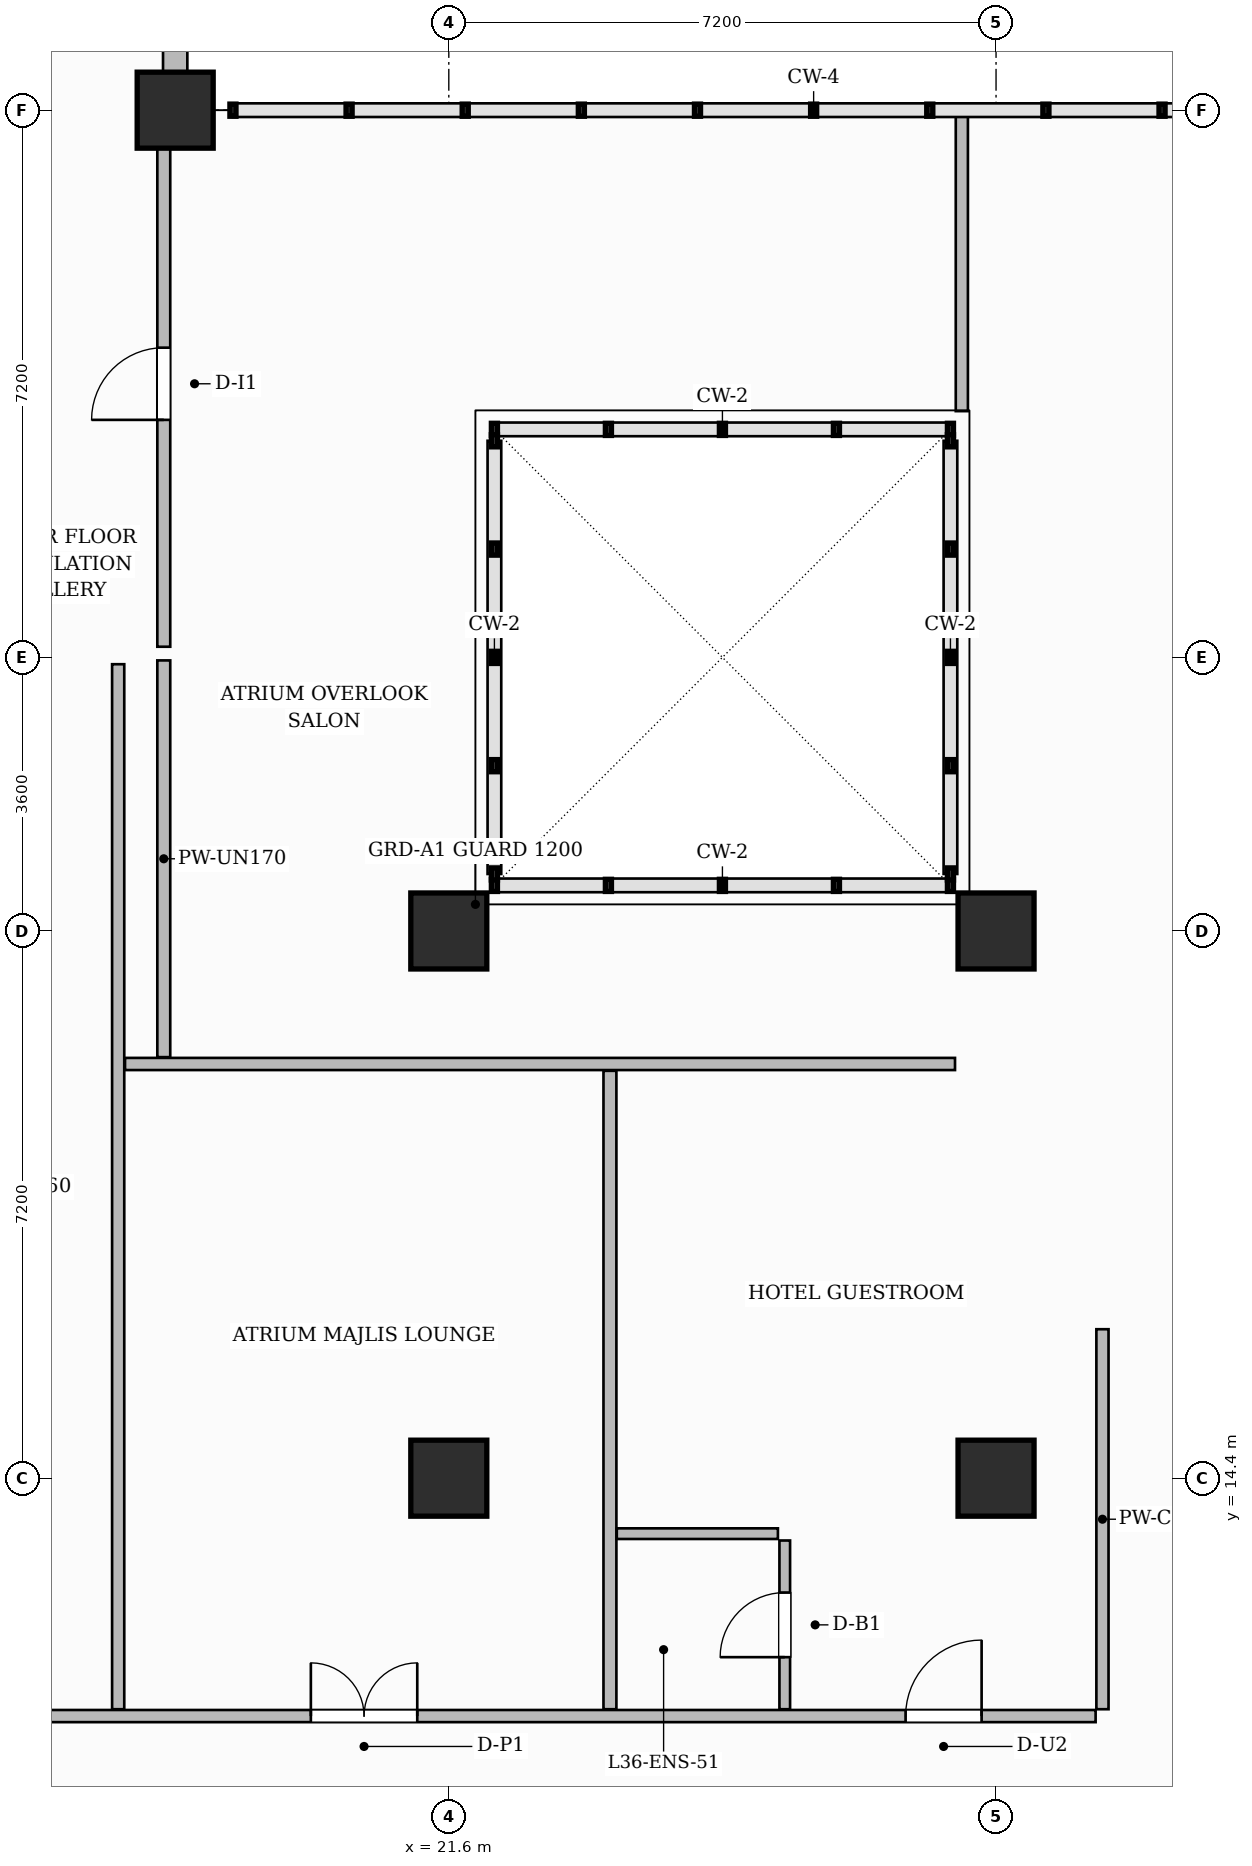
"""IFC4 building model, lengths in metres.
Left out: names, types, materials, properties, quantities, classifications, styles, units other than length and angle.
Written with IfcOpenShell. Run it as: python <this file> out.ifc"""

import sys

from ifc_helpers import new_model, si_unit, direction, frame, frame_2d, origin, origin_2d, place, context, subcontext, project, spatial, rectangle, extrude, source, transform, mapped, element, fill, save


model = new_model("IFC4")
c1 = context("Model", 3, precision=1e-05, world=origin(), true_north=direction((0.0, 1.0)))
c2 = subcontext(c1, "Body", "Model", "MODEL_VIEW")
j1 = project(units=[si_unit("LENGTHUNIT", "METRE"), si_unit("PLANEANGLEUNIT", "RADIAN")], contexts=[c1])
p1 = place(None, origin())
s1 = spatial("IfcSite", under=j1, at=p1, CompositionType="ELEMENT")
p2 = place(p1, origin())
s2 = spatial("IfcBuilding", under=s1, at=p2, CompositionType="ELEMENT")
p3 = place(p2, frame((0.0, 0.0, 145.1)))
s3 = spatial("IfcBuildingStorey", under=s2, at=p3, CompositionType="ELEMENT", Elevation=145.1)
m1 = source(origin(), c2, "Body", "SweptSolid", [
    extrude(rectangle(XDim=1.0, YDim=1.0, at=origin_2d()), origin(), (0.0, 0.0, 1.0), 5.2),
])
for number, where, z_axis, x_axis in (
    (1, (21.6, 14.4, 0.0), (0.0, 0.0, 1.0), (1.0, 0.0, 0.0)),
    (2, (21.6, 21.6, 0.0), (0.0, 0.0, 1.0), (1.0, 0.0, 0.0)),
    (3, (28.8, 14.4, 0.0), (0.0, 0.0, 1.0), (1.0, 0.0, 0.0)),
    (4, (28.8, 21.6, 0.0), (0.0, 0.0, 1.0), (1.0, 0.0, 0.0)),
    (5, (18.0, 32.4, 0.0), (0.0, 0.0, 1.0), (1.0, 0.0, 0.0)),
):
    element("IfcColumn", number, at=place(p3, frame(where, z_axis=z_axis, x_axis=x_axis)), inside=s3, PredefinedType="COLUMN", context=c2, shape_type="MappedRepresentation", body=[
        mapped(m1, transform((0.0, 0.0, 0.0), scale=1.0)),
    ])
p4 = place(p3, frame((14.568, 11.27, 0.0), z_axis=(0.0, 0.0, 1.0), x_axis=(1.0, 0.0, 0.0)))
e6 = element("IfcWall", 6, at=p4, inside=s3, PredefinedType="PARTITIONING", context=c2, shape_type="SweptSolid", body=[
    extrude(rectangle(XDim=15.542, YDim=0.16, at=frame_2d((7.771, 0.0))), origin(), (0.0, 0.0, 1.0), 4.95),
])
p5 = place(p4, frame((5.217, 0.0, 0.0)))
e7 = element("IfcOpeningElement", 7, at=p5, cuts=e6, PredefinedType="OPENING", context=c2, shape_type="SweptSolid", body=[
    extrude(rectangle(XDim=1.4, YDim=2.35, at=frame_2d((0.7, 1.175))), frame((0.0, 0.09, 0.0), z_axis=(0.0, -1.0, 0.0), x_axis=(1.0, 0.0, 0.0)), (0.0, 0.0, 1.0), 0.18),
])
p6 = place(p4, frame((13.042, 0.0, 0.0)))
e8 = element("IfcOpeningElement", 8, at=p6, cuts=e6, PredefinedType="OPENING", context=c2, shape_type="SweptSolid", body=[
    extrude(rectangle(XDim=1.0, YDim=2.2, at=frame_2d((0.5, 1.1))), frame((0.0, 0.09, 0.0), z_axis=(0.0, -1.0, 0.0), x_axis=(1.0, 0.0, 0.0)), (0.0, 0.0, 1.0), 0.18),
])
p7 = place(p3, frame((30.2, 11.36, 0.0), z_axis=(0.0, 0.0, 1.0), x_axis=(0.0, 1.0, 0.0)))
e9 = element("IfcWall", 9, at=p7, inside=s3, PredefinedType="PARTITIONING", context=c2, shape_type="SweptSolid", body=[
    extrude(rectangle(XDim=5.0, YDim=0.16, at=frame_2d((2.5, 0.0))), origin(), (0.0, 0.0, 1.0), 4.95),
])
p8 = place(p3, frame((17.25, 11.36, 0.0), z_axis=(0.0, 0.0, 1.0), x_axis=(0.0, 1.0, 0.0)))
e10 = element("IfcWall", 10, at=p8, inside=s3, PredefinedType="PARTITIONING", context=c2, shape_type="SweptSolid", body=[
    extrude(rectangle(XDim=13.75, YDim=0.16, at=frame_2d((6.875, 0.0))), origin(), (0.0, 0.0, 1.0), 4.95),
])
p9 = place(p3, frame((17.85, 19.94, 0.0), z_axis=(0.0, 0.0, 1.0), x_axis=(0.0, 1.0, 0.0)))
e11 = element("IfcWall", 11, at=p9, inside=s3, PredefinedType="PARTITIONING", context=c2, shape_type="SweptSolid", body=[
    extrude(rectangle(XDim=5.22, YDim=0.17, at=frame_2d((2.61, 0.0))), origin(), (0.0, 0.0, 1.0), 4.435),
])
p10 = place(p3, frame((17.85, 25.34, 0.0), z_axis=(0.0, 0.0, 1.0), x_axis=(0.0, 1.0, 0.0)))
e12 = element("IfcWall", 12, at=p10, inside=s3, PredefinedType="PARTITIONING", context=c2, shape_type="SweptSolid", body=[
    extrude(rectangle(XDim=6.87, YDim=0.17, at=frame_2d((3.435, 0.0))), origin(), (0.0, 0.0, 1.0), 4.95),
])
p11 = place(p10, frame((2.985, 0.0, 0.0)))
e13 = element("IfcOpeningElement", 13, at=p11, cuts=e12, PredefinedType="OPENING", context=c2, shape_type="SweptSolid", body=[
    extrude(rectangle(XDim=0.95, YDim=2.15, at=frame_2d((0.475, 1.075))), frame((0.0, 0.095, 0.0), z_axis=(0.0, -1.0, 0.0), x_axis=(1.0, 0.0, 0.0)), (0.0, 0.0, 1.0), 0.19),
])
p12 = place(p3, frame((28.35, 28.44, 0.0), z_axis=(0.0, 0.0, 1.0), x_axis=(0.0, 1.0, 0.0)))
e14 = element("IfcWall", 14, at=p12, inside=s3, PredefinedType="PARTITIONING", context=c2, shape_type="SweptSolid", body=[
    extrude(rectangle(XDim=3.932, YDim=0.16, at=frame_2d((1.966, 0.0))), origin(), (0.0, 0.0, 1.0), 4.95),
])
p13 = place(p3, frame((17.34, 19.85, 0.0), z_axis=(0.0, 0.0, 1.0), x_axis=(1.0, 0.0, 0.0)))
e15 = element("IfcWall", 15, at=p13, inside=s3, PredefinedType="PARTITIONING", context=c2, shape_type="SweptSolid", body=[
    extrude(rectangle(XDim=10.92, YDim=0.16, at=frame_2d((5.46, 0.0))), origin(), (0.0, 0.0, 1.0), 4.95),
])
p14 = place(p3, frame((23.72, 11.36, 0.0), z_axis=(0.0, 0.0, 1.0), x_axis=(0.0, 1.0, 0.0)))
e16 = element("IfcWall", 16, at=p14, inside=s3, PredefinedType="PARTITIONING", context=c2, shape_type="SweptSolid", body=[
    extrude(rectangle(XDim=8.4, YDim=0.17, at=frame_2d((4.2, 0.0))), origin(), (0.0, 0.0, 1.0), 4.95),
])
p15 = place(p3, frame((26.02, 11.36, 0.0), z_axis=(0.0, 0.0, 1.0), x_axis=(0.0, 1.0, 0.0)))
e17 = element("IfcWall", 17, at=p15, inside=s3, PredefinedType="PARTITIONING", context=c2, shape_type="SweptSolid", body=[
    extrude(rectangle(XDim=2.22, YDim=0.14, at=frame_2d((1.11, 0.0))), origin(), (0.0, 0.0, 1.0), 4.95),
])
p16 = place(p15, frame((0.685, 0.0, 0.0)))
e18 = element("IfcOpeningElement", 18, at=p16, cuts=e17, PredefinedType="OPENING", context=c2, shape_type="SweptSolid", body=[
    extrude(rectangle(XDim=0.85, YDim=2.1, at=frame_2d((0.425, 1.05))), frame((0.0, 0.08, 0.0), z_axis=(0.0, -1.0, 0.0), x_axis=(1.0, 0.0, 0.0)), (0.0, 0.0, 1.0), 0.16),
])
p17 = place(p3, frame((23.81, 13.67, 0.0), z_axis=(0.0, 0.0, 1.0), x_axis=(1.0, 0.0, 0.0)))
e19 = element("IfcWall", 19, at=p17, inside=s3, PredefinedType="PARTITIONING", context=c2, shape_type="SweptSolid", body=[
    extrude(rectangle(XDim=2.12, YDim=0.14, at=frame_2d((1.06, 0.0))), origin(), (0.0, 0.0, 1.0), 4.95),
])
p18 = place(p3, frame((18.0, 32.4, 0.0), z_axis=(0.0, 0.0, 1.0), x_axis=(0.0, 1.0, 0.0)))
e20 = element("IfcWall", 20, at=p18, inside=s3, PredefinedType="SOLIDWALL", context=c2, shape_type="SweptSolid", body=[
    extrude(rectangle(XDim=14.35, YDim=0.32, at=frame_2d((7.175, 0.0))), origin(), (0.0, 0.0, 1.0), 4.95),
])
p19 = place(p18, frame((0.85, 0.0, 0.0)))
e21 = element("IfcOpeningElement", 21, at=p19, cuts=e20, PredefinedType="OPENING", context=c2, shape_type="SweptSolid", body=[
    extrude(rectangle(XDim=1.2, YDim=2.2, at=frame_2d((0.6, 1.1))), frame((0.0, 0.17, 0.0), z_axis=(0.0, -1.0, 0.0), x_axis=(1.0, 0.0, 0.0)), (0.0, 0.0, 1.0), 0.34),
])
p20 = place(p18, frame((3.475, 0.0, 0.8)))
e22 = element("IfcOpeningElement", 22, at=p20, cuts=e20, PredefinedType="OPENING", context=c2, shape_type="SweptSolid", body=[
    extrude(rectangle(XDim=1.8, YDim=1.85, at=frame_2d((0.9, 0.925))), frame((0.0, 0.17, 0.0), z_axis=(0.0, -1.0, 0.0), x_axis=(1.0, 0.0, 0.0)), (0.0, 0.0, 1.0), 0.34),
])
p21 = place(p18, frame((8.525, 0.0, 0.8)))
e23 = element("IfcOpeningElement", 23, at=p21, cuts=e20, PredefinedType="OPENING", context=c2, shape_type="SweptSolid", body=[
    extrude(rectangle(XDim=1.8, YDim=1.85, at=frame_2d((0.9, 0.925))), frame((0.0, 0.17, 0.0), z_axis=(0.0, -1.0, 0.0), x_axis=(1.0, 0.0, 0.0)), (0.0, 0.0, 1.0), 0.34),
])
p22 = place(p18, frame((11.275, 0.0, 0.8)))
e24 = element("IfcOpeningElement", 24, at=p22, cuts=e20, PredefinedType="OPENING", context=c2, shape_type="SweptSolid", body=[
    extrude(rectangle(XDim=1.8, YDim=1.85, at=frame_2d((0.9, 0.925))), frame((0.0, 0.17, 0.0), z_axis=(0.0, -1.0, 0.0), x_axis=(1.0, 0.0, 0.0)), (0.0, 0.0, 1.0), 0.34),
])
m2 = source(origin(), c2, "Body", "SweptSolid", [
    extrude(rectangle(XDim=0.95, YDim=2.15, at=frame_2d((0.475, 1.075))), frame((0.0, 0.025, 0.0), z_axis=(0.0, -1.0, 0.0), x_axis=(1.0, 0.0, 0.0)), (0.0, 0.0, 1.0), 0.05),
])
p23 = place(p11, origin())
e25 = element("IfcDoor", 25, at=p23, inside=s3, OperationType="SINGLE_SWING_LEFT", PredefinedType="DOOR", context=c2, shape_type="MappedRepresentation", body=[
    mapped(m2, transform((0.0, 0.0, 0.0), scale=1.0)),
])
fill(e13, e25)
m3 = source(origin(), c2, "Body", "SweptSolid", [
    extrude(rectangle(XDim=1.4, YDim=2.35, at=frame_2d((0.7, 1.175))), frame((0.0, 0.025, 0.0), z_axis=(0.0, -1.0, 0.0), x_axis=(1.0, 0.0, 0.0)), (0.0, 0.0, 1.0), 0.05),
])
p24 = place(p5, origin())
e26 = element("IfcDoor", 26, at=p24, inside=s3, OperationType="DOUBLE_DOOR_SINGLE_SWING", PredefinedType="DOOR", context=c2, shape_type="MappedRepresentation", body=[
    mapped(m3, transform((0.0, 0.0, 0.0), scale=1.0)),
])
fill(e7, e26)
m4 = source(origin(), c2, "Body", "SweptSolid", [
    extrude(rectangle(XDim=0.85, YDim=2.1, at=frame_2d((0.425, 1.05))), frame((0.0, 0.025, 0.0), z_axis=(0.0, -1.0, 0.0), x_axis=(1.0, 0.0, 0.0)), (0.0, 0.0, 1.0), 0.05),
])
p25 = place(p16, origin())
e27 = element("IfcDoor", 27, at=p25, inside=s3, OperationType="SINGLE_SWING_LEFT", PredefinedType="DOOR", context=c2, shape_type="MappedRepresentation", body=[
    mapped(m4, transform((0.0, 0.0, 0.0), scale=1.0)),
])
fill(e18, e27)
m5 = source(origin(), c2, "Body", "SweptSolid", [
    extrude(rectangle(XDim=1.0, YDim=2.2, at=frame_2d((0.5, 1.1))), frame((0.0, 0.025, 0.0), z_axis=(0.0, -1.0, 0.0), x_axis=(1.0, 0.0, 0.0)), (0.0, 0.0, 1.0), 0.05),
])
p26 = place(p6, origin())
e28 = element("IfcDoor", 28, at=p26, inside=s3, OperationType="SINGLE_SWING_RIGHT", PredefinedType="DOOR", context=c2, shape_type="MappedRepresentation", body=[
    mapped(m5, transform((0.0, 0.0, 0.0), scale=1.0)),
])
fill(e8, e28)
save(model, sys.argv[1])
